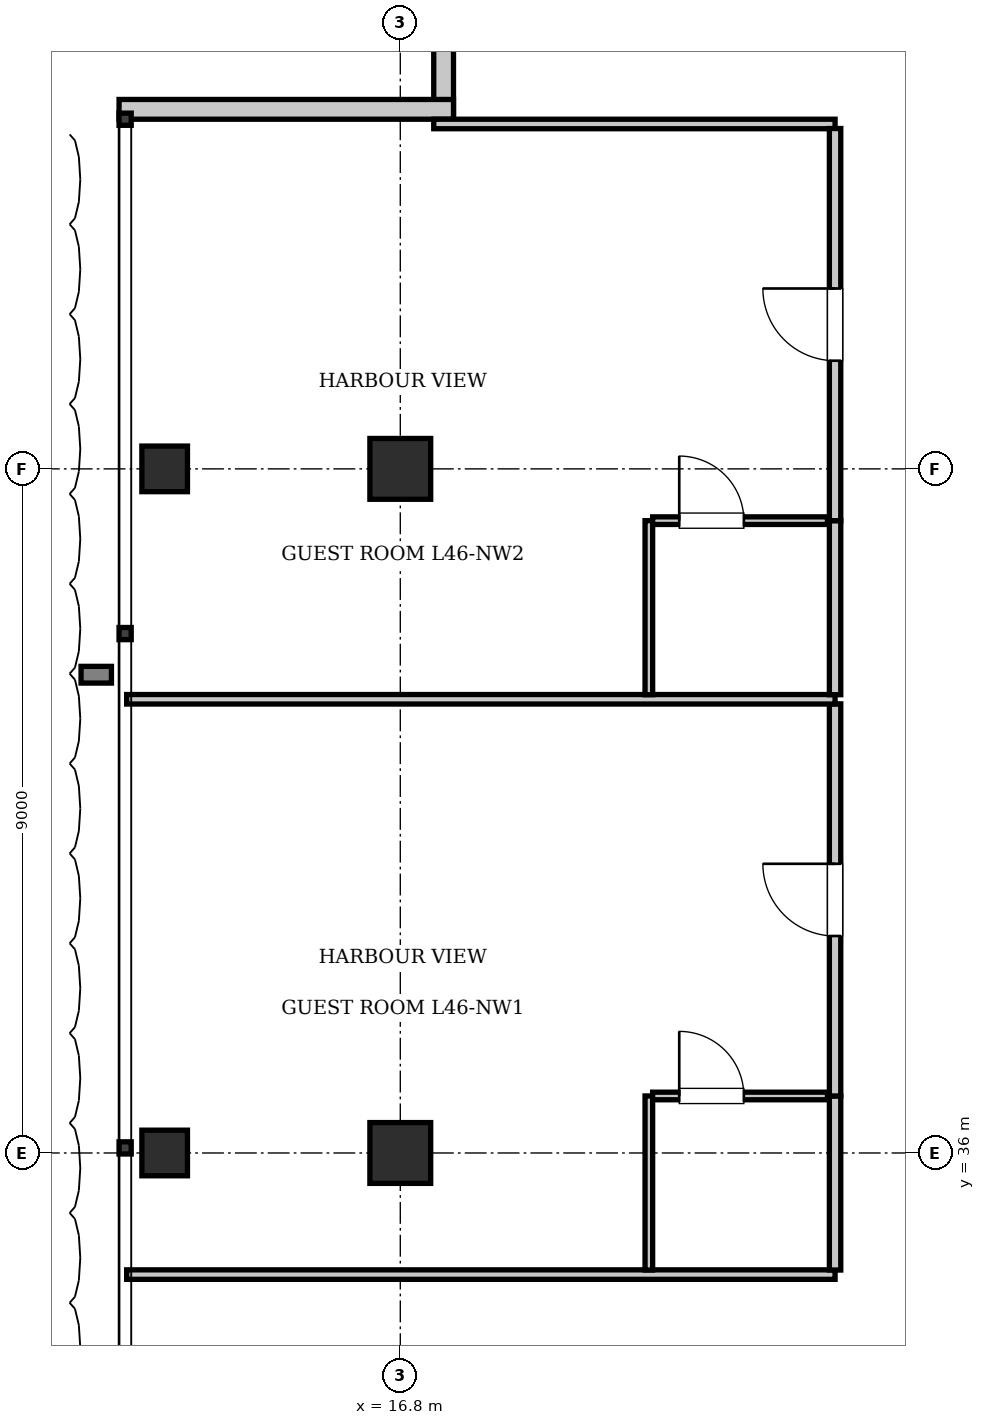
"""IFC4 building model, lengths in metres.
Left out: names, types, materials, properties, quantities, classifications, styles, units other than length and angle.
Written with IfcOpenShell. Run it as: python <this file> out.ifc"""

import sys

from ifc_helpers import new_model, si_unit, direction, frame, frame_2d, origin, origin_2d, place, context, subcontext, project, spatial, rectangle, i_section, extrude, element, fill, save


model = new_model("IFC4")
c1 = context("Model", 3, precision=1e-05, world=origin(), true_north=direction((0.0, 1.0)))
c2 = subcontext(c1, "Body", "Model", "MODEL_VIEW")
j1 = project(units=[si_unit("LENGTHUNIT", "METRE"), si_unit("PLANEANGLEUNIT", "RADIAN")], contexts=[c1])
p1 = place(None, origin())
s1 = spatial("IfcSite", under=j1, at=p1, CompositionType="ELEMENT")
p2 = place(p1, origin())
s2 = spatial("IfcBuilding", under=s1, at=p2, CompositionType="ELEMENT")
p3 = place(p2, frame((0.0, 0.0, 189.0)))
s3 = spatial("IfcBuildingStorey", under=s2, at=p3, CompositionType="ELEMENT", Elevation=189.0)
for number, where, z_axis, x_axis in (
    (1, (16.8, 36.0, 0.0), (0.0, 0.0, 1.0), (1.0, 0.0, 0.0)),
    (2, (16.8, 45.0, 0.0), (0.0, 0.0, 1.0), (1.0, 0.0, 0.0)),
):
    element("IfcColumn", number, at=place(p3, frame(where, z_axis=z_axis, x_axis=x_axis)), inside=s3, PredefinedType="COLUMN", context=c2, shape_type="SweptSolid", body=[
        extrude(rectangle(XDim=0.8, YDim=0.8, at=origin_2d()), origin(), (0.0, 0.0, 1.0), 3.85),
    ])
for number, where, z_axis, x_axis in (
    (3, (13.7, 36.0, 0.0), (0.0, 0.0, 1.0), (1.0, 0.0, 0.0)),
    (4, (13.7, 45.0, 0.0), (0.0, 0.0, 1.0), (1.0, 0.0, 0.0)),
):
    element("IfcColumn", number, at=place(p3, frame(where, z_axis=z_axis, x_axis=x_axis)), inside=s3, PredefinedType="COLUMN", context=c2, shape_type="SweptSolid", body=[
        extrude(i_section(OverallWidth=0.6, OverallDepth=0.6, WebThickness=0.025, FlangeThickness=0.038, at=origin_2d()), origin(), (0.0, 0.0, 1.0), 3.85),
    ])
for number, where, z_axis, x_axis in (
    (5, (17.37, 49.6, 0.0), (0.0, 0.0, 1.0), (0.0, 1.0, 0.0)),
    (6, (13.1, 49.73, 0.0), (0.0, 0.0, 1.0), (1.0, 0.0, 0.0)),
):
    element("IfcWall", number, at=place(p3, frame(where, z_axis=z_axis, x_axis=x_axis)), inside=s3, PredefinedType="SOLIDWALL", context=c2, shape_type="SweptSolid", body=[
        extrude(rectangle(XDim=4.4, YDim=0.26, at=frame_2d((2.2, 0.0))), origin(), (0.0, 0.0, 1.0), 3.61),
    ])
p4 = place(p3, frame((13.2, 34.4, 0.0), z_axis=(0.0, 0.0, 1.0), x_axis=(1.0, 0.0, 0.0)))
e7 = element("IfcWall", 7, at=p4, inside=s3, PredefinedType="PARTITIONING", context=c2, shape_type="SweptSolid", body=[
    extrude(rectangle(XDim=9.32, YDim=0.125, at=frame_2d((4.66, 0.0))), origin(), (0.0, 0.0, 1.0), 3.61),
])
p5 = place(p3, frame((17.24, 49.538, 0.0), z_axis=(0.0, 0.0, 1.0), x_axis=(1.0, 0.0, 0.0)))
e8 = element("IfcWall", 8, at=p5, inside=s3, PredefinedType="PARTITIONING", context=c2, shape_type="SweptSolid", body=[
    extrude(rectangle(XDim=5.28, YDim=0.125, at=frame_2d((2.64, 0.0))), origin(), (0.0, 0.0, 1.0), 3.61),
])
p6 = place(p3, frame((22.52, 34.46, 0.0), z_axis=(0.0, 0.0, 1.0), x_axis=(0.0, 1.0, 0.0)))
e9 = element("IfcWall", 9, at=p6, inside=s3, PredefinedType="PARTITIONING", context=c2, shape_type="SweptSolid", body=[
    extrude(rectangle(XDim=2.29, YDim=0.15, at=frame_2d((1.145, 0.0))), origin(), (0.0, 0.0, 1.0), 3.61),
])
p7 = place(p3, frame((22.52, 36.75, 0.0), z_axis=(0.0, 0.0, 1.0), x_axis=(0.0, 1.0, 0.0)))
e10 = element("IfcWall", 10, at=p7, inside=s3, PredefinedType="PARTITIONING", context=c2, shape_type="SweptSolid", body=[
    extrude(rectangle(XDim=5.159, YDim=0.15, at=frame_2d((2.579, 0.0))), origin(), (0.0, 0.0, 1.0), 3.61),
])
p8 = place(p7, frame((2.104, 0.0, 0.0)))
e11 = element("IfcOpeningElement", 11, at=p8, cuts=e10, PredefinedType="OPENING", context=c2, shape_type="SweptSolid", body=[
    extrude(rectangle(XDim=0.95, YDim=2.15, at=frame_2d((0.475, 1.075))), frame((0.0, 0.085, 0.0), z_axis=(0.0, -1.0, 0.0), x_axis=(1.0, 0.0, 0.0)), (0.0, 0.0, 1.0), 0.17),
])
p9 = place(p3, frame((20.07, 34.46, 0.0), z_axis=(0.0, 0.0, 1.0), x_axis=(0.0, 1.0, 0.0)))
e12 = element("IfcWall", 12, at=p9, inside=s3, PredefinedType="PARTITIONING", context=c2, shape_type="SweptSolid", body=[
    extrude(rectangle(XDim=2.29, YDim=0.1, at=frame_2d((1.145, 0.0))), origin(), (0.0, 0.0, 1.0), 3.61),
])
p10 = place(p3, frame((20.12, 36.75, 0.0), z_axis=(0.0, 0.0, 1.0), x_axis=(1.0, 0.0, 0.0)))
e13 = element("IfcWall", 13, at=p10, inside=s3, PredefinedType="PARTITIONING", context=c2, shape_type="SweptSolid", body=[
    extrude(rectangle(XDim=2.3, YDim=0.1, at=frame_2d((1.15, 0.0))), origin(), (0.0, 0.0, 1.0), 3.61),
])
p11 = place(p10, frame((0.35, 0.0, 0.0)))
e14 = element("IfcOpeningElement", 14, at=p11, cuts=e13, PredefinedType="OPENING", context=c2, shape_type="SweptSolid", body=[
    extrude(rectangle(XDim=0.85, YDim=2.1, at=frame_2d((0.425, 1.05))), frame((0.0, 0.06, 0.0), z_axis=(0.0, -1.0, 0.0), x_axis=(1.0, 0.0, 0.0)), (0.0, 0.0, 1.0), 0.12),
])
p12 = place(p3, frame((13.2, 41.969, 0.0), z_axis=(0.0, 0.0, 1.0), x_axis=(1.0, 0.0, 0.0)))
e15 = element("IfcWall", 15, at=p12, inside=s3, PredefinedType="PARTITIONING", context=c2, shape_type="SweptSolid", body=[
    extrude(rectangle(XDim=9.32, YDim=0.125, at=frame_2d((4.66, 0.0))), origin(), (0.0, 0.0, 1.0), 3.61),
])
p13 = place(p3, frame((22.52, 42.029, 0.0), z_axis=(0.0, 0.0, 1.0), x_axis=(0.0, 1.0, 0.0)))
e16 = element("IfcWall", 16, at=p13, inside=s3, PredefinedType="PARTITIONING", context=c2, shape_type="SweptSolid", body=[
    extrude(rectangle(XDim=2.29, YDim=0.15, at=frame_2d((1.145, 0.0))), origin(), (0.0, 0.0, 1.0), 3.61),
])
p14 = place(p3, frame((22.52, 44.319, 0.0), z_axis=(0.0, 0.0, 1.0), x_axis=(0.0, 1.0, 0.0)))
e17 = element("IfcWall", 17, at=p14, inside=s3, PredefinedType="PARTITIONING", context=c2, shape_type="SweptSolid", body=[
    extrude(rectangle(XDim=5.159, YDim=0.15, at=frame_2d((2.579, 0.0))), origin(), (0.0, 0.0, 1.0), 3.61),
])
p15 = place(p14, frame((2.104, 0.0, 0.0)))
e18 = element("IfcOpeningElement", 18, at=p15, cuts=e17, PredefinedType="OPENING", context=c2, shape_type="SweptSolid", body=[
    extrude(rectangle(XDim=0.95, YDim=2.15, at=frame_2d((0.475, 1.075))), frame((0.0, 0.085, 0.0), z_axis=(0.0, -1.0, 0.0), x_axis=(1.0, 0.0, 0.0)), (0.0, 0.0, 1.0), 0.17),
])
p16 = place(p3, frame((20.07, 42.029, 0.0), z_axis=(0.0, 0.0, 1.0), x_axis=(0.0, 1.0, 0.0)))
e19 = element("IfcWall", 19, at=p16, inside=s3, PredefinedType="PARTITIONING", context=c2, shape_type="SweptSolid", body=[
    extrude(rectangle(XDim=2.29, YDim=0.1, at=frame_2d((1.145, 0.0))), origin(), (0.0, 0.0, 1.0), 3.61),
])
p17 = place(p3, frame((20.12, 44.319, 0.0), z_axis=(0.0, 0.0, 1.0), x_axis=(1.0, 0.0, 0.0)))
e20 = element("IfcWall", 20, at=p17, inside=s3, PredefinedType="PARTITIONING", context=c2, shape_type="SweptSolid", body=[
    extrude(rectangle(XDim=2.3, YDim=0.1, at=frame_2d((1.15, 0.0))), origin(), (0.0, 0.0, 1.0), 3.61),
])
p18 = place(p17, frame((0.35, 0.0, 0.0)))
e21 = element("IfcOpeningElement", 21, at=p18, cuts=e20, PredefinedType="OPENING", context=c2, shape_type="SweptSolid", body=[
    extrude(rectangle(XDim=0.85, YDim=2.1, at=frame_2d((0.425, 1.05))), frame((0.0, 0.06, 0.0), z_axis=(0.0, -1.0, 0.0), x_axis=(1.0, 0.0, 0.0)), (0.0, 0.0, 1.0), 0.12),
])
p19 = place(p11, origin())
e22 = element("IfcDoor", 22, at=p19, inside=s3, OperationType="SINGLE_SWING_LEFT", PredefinedType="DOOR", context=c2, shape_type="SweptSolid", body=[
    extrude(rectangle(XDim=0.85, YDim=2.1, at=frame_2d((0.425, 1.05))), frame((0.0, 0.025, 0.0), z_axis=(0.0, -1.0, 0.0), x_axis=(1.0, 0.0, 0.0)), (0.0, 0.0, 1.0), 0.05),
])
fill(e14, e22)
p20 = place(p8, origin())
e23 = element("IfcDoor", 23, at=p20, inside=s3, OperationType="SINGLE_SWING_RIGHT", PredefinedType="DOOR", context=c2, shape_type="SweptSolid", body=[
    extrude(rectangle(XDim=0.95, YDim=2.15, at=frame_2d((0.475, 1.075))), frame((0.0, 0.025, 0.0), z_axis=(0.0, -1.0, 0.0), x_axis=(1.0, 0.0, 0.0)), (0.0, 0.0, 1.0), 0.05),
])
fill(e11, e23)
p21 = place(p18, origin())
e24 = element("IfcDoor", 24, at=p21, inside=s3, OperationType="SINGLE_SWING_LEFT", PredefinedType="DOOR", context=c2, shape_type="SweptSolid", body=[
    extrude(rectangle(XDim=0.85, YDim=2.1, at=frame_2d((0.425, 1.05))), frame((0.0, 0.025, 0.0), z_axis=(0.0, -1.0, 0.0), x_axis=(1.0, 0.0, 0.0)), (0.0, 0.0, 1.0), 0.05),
])
fill(e21, e24)
p22 = place(p15, origin())
e25 = element("IfcDoor", 25, at=p22, inside=s3, OperationType="SINGLE_SWING_RIGHT", PredefinedType="DOOR", context=c2, shape_type="SweptSolid", body=[
    extrude(rectangle(XDim=0.95, YDim=2.15, at=frame_2d((0.475, 1.075))), frame((0.0, 0.025, 0.0), z_axis=(0.0, -1.0, 0.0), x_axis=(1.0, 0.0, 0.0)), (0.0, 0.0, 1.0), 0.05),
])
fill(e18, e25)
save(model, sys.argv[1])
